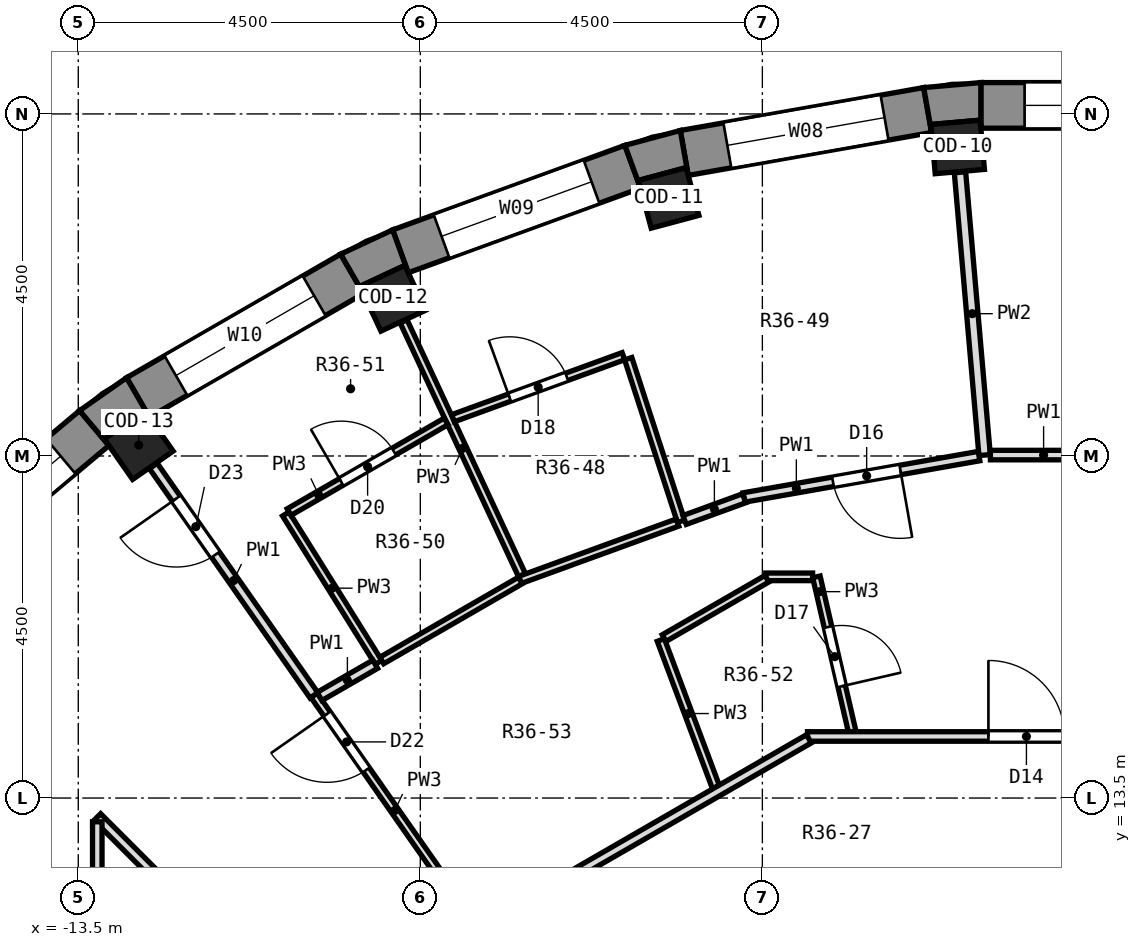
"""IFC4 building model, lengths in metres.
Left out: names, types, materials, properties, quantities, classifications, styles, units other than length and angle.
Written with IfcOpenShell. Run it as: python <this file> out.ifc"""

import sys

from ifc_helpers import new_model, si_unit, direction, frame, frame_2d, origin, origin_2d, place, context, subcontext, project, spatial, polyline, rectangle, outline, extrude, element, fill, save


model = new_model("IFC4")
c1 = context("Model", 3, precision=1e-05, world=origin(), true_north=direction((0.0, 1.0)))
c2 = subcontext(c1, "Body", "Model", "MODEL_VIEW")
j1 = project(units=[si_unit("LENGTHUNIT", "METRE"), si_unit("PLANEANGLEUNIT", "RADIAN")], contexts=[c1])
p1 = place(None, origin())
s1 = spatial("IfcSite", under=j1, at=p1, CompositionType="ELEMENT")
p2 = place(p1, origin())
s2 = spatial("IfcBuilding", under=s1, at=p2, CompositionType="ELEMENT")
p3 = place(p2, frame((0.0, 0.0, 259.4)))
s3 = spatial("IfcBuildingStorey", under=s2, at=p3, CompositionType="ELEMENT", Elevation=259.4)
for number, where, z_axis, x_axis in (
    (1, (-1.93, 22.066, 0.0), (0.0, 0.0, 1.0), (-0.087, 0.996, 0.0)),
    (2, (-5.733, 21.395, 0.0), (0.0, 0.0, 1.0), (-0.259, 0.966, 0.0)),
    (3, (-9.361, 20.075, 0.0), (0.0, 0.0, 1.0), (-0.423, 0.906, 0.0)),
    (4, (-12.705, 18.144, 0.0), (0.0, 0.0, 1.0), (-0.574, 0.819, 0.0)),
):
    element("IfcColumn", number, at=place(p3, frame(where, z_axis=z_axis, x_axis=x_axis)), inside=s3, PredefinedType="COLUMN", context=c2, shape_type="SweptSolid", body=[
        extrude(rectangle(XDim=0.65, YDim=0.65, at=origin_2d()), origin(), (0.0, 0.0, 1.0), 3.3),
    ])
p4 = place(p3, frame((1.626, 22.613, 0.0), z_axis=(0.0, 0.0, 1.0), x_axis=(-1.0, 0.0, 0.0)))
e5 = element("IfcWall", 5, at=p4, inside=s3, PredefinedType="SOLIDWALL", context=c2, shape_type="SweptSolid", body=[
    extrude(rectangle(XDim=3.251, YDim=0.6, at=frame_2d((1.626, 0.0))), origin(), (0.0, 0.0, 1.0), 2.9),
])
p5 = place(p4, frame((0.576, 0.0, 0.9)))
e6 = element("IfcOpeningElement", 6, at=p5, cuts=e5, PredefinedType="OPENING", context=c2, shape_type="SweptSolid", body=[
    extrude(rectangle(XDim=2.1, YDim=1.8, at=frame_2d((1.05, 0.9))), frame((0.0, 0.312, 0.0), z_axis=(0.0, -1.0, 0.0), x_axis=(1.0, 0.0, 0.0)), (0.0, 0.0, 1.0), 0.624),
])
p6 = place(p3, frame((-2.325, 22.551, 0.0), z_axis=(0.0, 0.0, 1.0), x_axis=(-0.984806225186, -0.173656842178, 0.0)))
e7 = element("IfcWall", 7, at=p6, inside=s3, PredefinedType="SOLIDWALL", context=c2, shape_type="SweptSolid", body=[
    extrude(rectangle(XDim=3.252, YDim=0.6, at=frame_2d((1.626, 0.0))), origin(), (0.0, 0.0, 1.0), 2.9),
])
p7 = place(p6, frame((0.576, 0.0, 0.9)))
e8 = element("IfcOpeningElement", 8, at=p7, cuts=e7, PredefinedType="OPENING", context=c2, shape_type="SweptSolid", body=[
    extrude(rectangle(XDim=2.1, YDim=1.8, at=frame_2d((1.05, 0.9))), frame((0.0, 0.312, 0.0), z_axis=(0.0, -1.0, 0.0), x_axis=(1.0, 0.0, 0.0)), (0.0, 0.0, 1.0), 0.624),
])
p8 = place(p3, frame((-6.206, 21.805, 0.0), z_axis=(0.0, 0.0, 1.0), x_axis=(-0.939679383794, -0.342056509473, 0.0)))
e9 = element("IfcWall", 9, at=p8, inside=s3, PredefinedType="SOLIDWALL", context=c2, shape_type="SweptSolid", body=[
    extrude(rectangle(XDim=3.252, YDim=0.6, at=frame_2d((1.626, 0.0))), origin(), (0.0, 0.0, 1.0), 2.9),
])
p9 = place(p8, frame((0.576, 0.0, 0.9)))
e10 = element("IfcOpeningElement", 10, at=p9, cuts=e9, PredefinedType="OPENING", context=c2, shape_type="SweptSolid", body=[
    extrude(rectangle(XDim=2.1, YDim=1.8, at=frame_2d((1.05, 0.9))), frame((0.0, 0.312, 0.0), z_axis=(0.0, -1.0, 0.0), x_axis=(1.0, 0.0, 0.0)), (0.0, 0.0, 1.0), 0.624),
])
p10 = place(p3, frame((-9.898, 20.396, 0.0), z_axis=(0.0, 0.0, 1.0), x_axis=(-0.866016800201, -0.500014901547, 0.0)))
e11 = element("IfcWall", 11, at=p10, inside=s3, PredefinedType="SOLIDWALL", context=c2, shape_type="SweptSolid", body=[
    extrude(rectangle(XDim=3.252, YDim=0.6, at=frame_2d((1.626, 0.0))), origin(), (0.0, 0.0, 1.0), 2.9),
])
p11 = place(p10, frame((0.576, 0.0, 0.9)))
e12 = element("IfcOpeningElement", 12, at=p11, cuts=e11, PredefinedType="OPENING", context=c2, shape_type="SweptSolid", body=[
    extrude(rectangle(XDim=2.1, YDim=1.8, at=frame_2d((1.05, 0.9))), frame((0.0, 0.312, 0.0), z_axis=(0.0, -1.0, 0.0), x_axis=(1.0, 0.0, 0.0)), (0.0, 0.0, 1.0), 0.624),
])
p12 = place(p3, frame((-13.29, 18.367, 0.0), z_axis=(0.0, 0.0, 1.0), x_axis=(-0.766056773982, -0.64277291405, 0.0)))
e13 = element("IfcWall", 13, at=p12, inside=s3, PredefinedType="SOLIDWALL", context=c2, shape_type="SweptSolid", body=[
    extrude(rectangle(XDim=3.252, YDim=0.6, at=frame_2d((1.626, 0.0))), origin(), (0.0, 0.0, 1.0), 2.9),
])
p13 = place(p12, frame((0.576, 0.0, 0.9)))
e14 = element("IfcOpeningElement", 14, at=p13, cuts=e13, PredefinedType="OPENING", context=c2, shape_type="SweptSolid", body=[
    extrude(rectangle(XDim=2.1, YDim=1.8, at=frame_2d((1.05, 0.9))), frame((0.0, 0.312, 0.0), z_axis=(0.0, -1.0, 0.0), x_axis=(1.0, 0.0, 0.0)), (0.0, 0.0, 1.0), 0.624),
])
p14 = place(p3, origin())
e15 = element("IfcWall", 15, at=p14, inside=s3, PredefinedType="SOLIDWALL", context=c2, shape_type="SweptSolid", body=[
    extrude(outline(polyline([(-1.626, 22.913), (-2.378, 22.847), (-2.273, 22.256), (-2.283, 22.361), (-1.635, 22.418), (-1.626, 22.312), (-1.626, 22.913)])), origin(), (0.0, 0.0, 1.0), 2.9),
])
p15 = place(p3, origin())
e16 = element("IfcWall", 16, at=p15, inside=s3, PredefinedType="SOLIDWALL", context=c2, shape_type="SweptSolid", body=[
    extrude(outline(polyline([(-6.309, 22.087), (-6.104, 21.523), (-6.131, 21.625), (-5.503, 21.793), (-5.476, 21.691), (-5.58, 22.282), (-6.309, 22.087)])), origin(), (0.0, 0.0, 1.0), 2.9),
])
p16 = place(p3, origin())
e17 = element("IfcWall", 17, at=p16, inside=s3, PredefinedType="SOLIDWALL", context=c2, shape_type="SweptSolid", body=[
    extrude(outline(polyline([(-9.364, 20.975), (-10.048, 20.656), (-9.748, 20.136), (-9.793, 20.232), (-9.204, 20.507), (-9.159, 20.411), (-9.364, 20.975)])), origin(), (0.0, 0.0, 1.0), 2.9),
])
p17 = place(p3, origin())
e18 = element("IfcWall", 18, at=p17, inside=s3, PredefinedType="SOLIDWALL", context=c2, shape_type="SweptSolid", body=[
    extrude(outline(polyline([(-12.864, 19.03), (-13.482, 18.597), (-13.097, 18.137), (-13.157, 18.224), (-12.625, 18.597), (-12.564, 18.51), (-12.864, 19.03)])), origin(), (0.0, 0.0, 1.0), 2.9),
])
p18 = place(p3, frame((-1.9, 21.732, 0.0), z_axis=(0.0, 0.0, 1.0), x_axis=(0.086821454474, -0.996223888011, 0.0)))
e19 = element("IfcWall", 19, at=p18, inside=s3, PredefinedType="PARTITIONING", context=c2, shape_type="SweptSolid", body=[
    extrude(rectangle(XDim=3.734, YDim=0.15, at=frame_2d((1.867, 0.0))), origin(), (0.0, 0.0, 1.0), 2.9),
])
p19 = place(p3, frame((-3.789, 16.41, 0.0), z_axis=(0.0, 0.0, 1.0), x_axis=(0.22503842629, -0.974349889256, 0.0)))
e20 = element("IfcWall", 20, at=p19, inside=s3, PredefinedType="PARTITIONING", context=c2, shape_type="SweptSolid", body=[
    extrude(rectangle(XDim=2.093, YDim=0.1, at=frame_2d((1.046, 0.0))), origin(), (0.0, 0.0, 1.0), 2.9),
])
p20 = place(p19, frame((0.677, 0.0, 0.0)))
e21 = element("IfcOpeningElement", 21, at=p20, cuts=e20, PredefinedType="OPENING", context=c2, shape_type="SweptSolid", body=[
    extrude(rectangle(XDim=0.8, YDim=2.1, at=frame_2d((0.4, 1.05))), frame((0.0, 0.062, 0.0), z_axis=(0.0, -1.0, 0.0), x_axis=(1.0, 0.0, 0.0)), (0.0, 0.0, 1.0), 0.124),
])
p21 = place(p3, frame((-6.265, 19.281, 0.0), z_axis=(0.0, 0.0, 1.0), x_axis=(0.308892186689, -0.951097059717, 0.0)))
e22 = element("IfcWall", 22, at=p21, inside=s3, PredefinedType="PARTITIONING", context=c2, shape_type="SweptSolid", body=[
    extrude(rectangle(XDim=2.25, YDim=0.1, at=frame_2d((1.125, 0.0))), origin(), (0.0, 0.0, 1.0), 2.9),
])
p22 = place(p3, frame((-5.836, 15.579, 0.0), z_axis=(0.0, 0.0, 1.0), x_axis=(0.350786772872, -0.936455359309, 0.0)))
e23 = element("IfcWall", 23, at=p22, inside=s3, PredefinedType="PARTITIONING", context=c2, shape_type="SweptSolid", body=[
    extrude(rectangle(XDim=2.066, YDim=0.1, at=frame_2d((1.033, 0.0))), origin(), (0.0, 0.0, 1.0), 2.9),
])
p23 = place(p3, frame((-9.22, 19.771, 0.0), z_axis=(0.0, 0.0, 1.0), x_axis=(0.422606093897, -0.906313460896, 0.0)))
e24 = element("IfcWall", 24, at=p23, inside=s3, PredefinedType="PARTITIONING", context=c2, shape_type="SweptSolid", body=[
    extrude(rectangle(XDim=3.684, YDim=0.1, at=frame_2d((1.842, 0.0))), origin(), (0.0, 0.0, 1.0), 2.9),
])
p24 = place(p3, frame((-10.77, 17.237, 0.0), z_axis=(0.0, 0.0, 1.0), x_axis=(0.529960807047, -0.848022135911, 0.0)))
e25 = element("IfcWall", 25, at=p24, inside=s3, PredefinedType="PARTITIONING", context=c2, shape_type="SweptSolid", body=[
    extrude(rectangle(XDim=2.302, YDim=0.1, at=frame_2d((1.151, 0.0))), origin(), (0.0, 0.0, 1.0), 2.9),
])
p25 = place(p3, frame((-10.399, 14.852, 0.0), z_axis=(0.0, 0.0, 1.0), x_axis=(0.573661423556, -0.819092529037, 0.0)))
e26 = element("IfcWall", 26, at=p25, inside=s3, PredefinedType="PARTITIONING", context=c2, shape_type="SweptSolid", body=[
    extrude(rectangle(XDim=3.703, YDim=0.1, at=frame_2d((1.852, 0.0))), origin(), (0.0, 0.0, 1.0), 2.9),
])
p26 = place(p25, frame((0.299, 0.0, 0.0)))
e27 = element("IfcOpeningElement", 27, at=p26, cuts=e26, PredefinedType="OPENING", context=c2, shape_type="SweptSolid", body=[
    extrude(rectangle(XDim=0.9, YDim=2.1, at=frame_2d((0.45, 1.05))), frame((0.0, 0.062, 0.0), z_axis=(0.0, -1.0, 0.0), x_axis=(1.0, 0.0, 0.0)), (0.0, 0.0, 1.0), 0.124),
])
p27 = place(p3, frame((-12.513, 17.87, 0.0), z_axis=(0.0, 0.0, 1.0), x_axis=(0.573564635471, -0.819160307228, 0.0)))
e28 = element("IfcWall", 28, at=p27, inside=s3, PredefinedType="PARTITIONING", context=c2, shape_type="SweptSolid", body=[
    extrude(rectangle(XDim=3.684, YDim=0.125, at=frame_2d((1.842, 0.0))), origin(), (0.0, 0.0, 1.0), 2.9),
])
p28 = place(p27, frame((0.526, 0.0, 0.0)))
e29 = element("IfcOpeningElement", 29, at=p28, cuts=e28, PredefinedType="OPENING", context=c2, shape_type="SweptSolid", body=[
    extrude(rectangle(XDim=0.9, YDim=2.1, at=frame_2d((0.45, 1.05))), frame((0.0, 0.074, 0.0), z_axis=(0.0, -1.0, 0.0), x_axis=(1.0, 0.0, 0.0)), (0.0, 0.0, 1.0), 0.149),
])
p29 = place(p3, frame((-13.25, 13.25, 0.0), z_axis=(0.0, 0.0, 1.0), x_axis=(0.707106781187, -0.707106781187, 0.0)))
e30 = element("IfcWall", 30, at=p29, inside=s3, PredefinedType="PARTITIONING", context=c2, shape_type="SweptSolid", body=[
    extrude(rectangle(XDim=3.923, YDim=0.125, at=frame_2d((1.961, 0.0))), origin(), (0.0, 0.0, 1.0), 2.9),
])
p30 = place(p3, frame((-3.906, 14.31, 0.0), z_axis=(0.0, 0.0, 1.0), x_axis=(1.0, 0.0, 0.0)))
e31 = element("IfcWall", 31, at=p30, inside=s3, PredefinedType="PARTITIONING", context=c2, shape_type="SweptSolid", body=[
    extrude(rectangle(XDim=7.677, YDim=0.125, at=frame_2d((3.838, 0.0))), origin(), (0.0, 0.0, 1.0), 2.9),
])
p31 = place(p30, frame((5.949, 0.0, 0.0)))
e32 = element("IfcOpeningElement", 32, at=p31, cuts=e31, PredefinedType="OPENING", context=c2, shape_type="SweptSolid", body=[
    extrude(rectangle(XDim=1.0, YDim=2.1, at=frame_2d((0.5, 1.05))), frame((0.0, 0.074, 0.0), z_axis=(0.0, -1.0, 0.0), x_axis=(1.0, 0.0, 0.0)), (0.0, 0.0, 1.0), 0.149),
])
p32 = place(p30, frame((2.38, 0.0, 0.0)))
e33 = element("IfcOpeningElement", 33, at=p32, cuts=e31, PredefinedType="OPENING", context=c2, shape_type="SweptSolid", body=[
    extrude(rectangle(XDim=1.0, YDim=2.1, at=frame_2d((0.5, 1.05))), frame((0.0, 0.074, 0.0), z_axis=(0.0, -1.0, 0.0), x_axis=(1.0, 0.0, 0.0)), (0.0, 0.0, 1.0), 0.149),
])
p33 = place(p3, frame((-4.455, 16.41, 0.0), z_axis=(0.0, 0.0, 1.0), x_axis=(1.0, 0.0, 0.0)))
e34 = element("IfcWall", 34, at=p33, inside=s3, PredefinedType="PARTITIONING", context=c2, shape_type="SweptSolid", body=[
    extrude(rectangle(XDim=0.616, YDim=0.1, at=frame_2d((0.308, 0.0))), origin(), (0.0, 0.0, 1.0), 2.9),
])
p34 = place(p3, frame((-1.5, 18.012, 0.0), z_axis=(0.0, 0.0, 1.0), x_axis=(1.0, 0.0, 0.0)))
e35 = element("IfcWall", 35, at=p34, inside=s3, PredefinedType="PARTITIONING", context=c2, shape_type="SweptSolid", body=[
    extrude(rectangle(XDim=3.0, YDim=0.125, at=frame_2d((1.5, 0.0))), origin(), (0.0, 0.0, 1.0), 2.9),
])
p35 = place(p34, frame((1.05, 0.0, 0.0)))
e36 = element("IfcOpeningElement", 36, at=p35, cuts=e35, PredefinedType="OPENING", context=c2, shape_type="SweptSolid", body=[
    extrude(rectangle(XDim=0.9, YDim=2.1, at=frame_2d((0.45, 1.05))), frame((0.0, 0.074, 0.0), z_axis=(0.0, -1.0, 0.0), x_axis=(1.0, 0.0, 0.0)), (0.0, 0.0, 1.0), 0.149),
])
p36 = place(p3, frame((-4.742, 17.454, 0.0), z_axis=(0.0, 0.0, 1.0), x_axis=(0.984857040105, 0.173368424332, 0.0)))
e37 = element("IfcWall", 37, at=p36, inside=s3, PredefinedType="PARTITIONING", context=c2, shape_type="SweptSolid", body=[
    extrude(rectangle(XDim=3.14, YDim=0.125, at=frame_2d((1.57, 0.0))), origin(), (0.0, 0.0, 1.0), 2.9),
])
p37 = place(p36, frame((1.189, 0.0, 0.0)))
e38 = element("IfcOpeningElement", 38, at=p37, cuts=e37, PredefinedType="OPENING", context=c2, shape_type="SweptSolid", body=[
    extrude(rectangle(XDim=0.9, YDim=2.1, at=frame_2d((0.45, 1.05))), frame((0.0, 0.074, 0.0), z_axis=(0.0, -1.0, 0.0), x_axis=(1.0, 0.0, 0.0)), (0.0, 0.0, 1.0), 0.149),
])
p38 = place(p3, frame((-7.689, 16.37, 0.0), z_axis=(0.0, 0.0, 1.0), x_axis=(0.939680214162, 0.342054228323, 0.0)))
e39 = element("IfcWall", 39, at=p38, inside=s3, PredefinedType="PARTITIONING", context=c2, shape_type="SweptSolid", body=[
    extrude(rectangle(XDim=2.205, YDim=0.1, at=frame_2d((1.103, 0.0))), origin(), (0.0, 0.0, 1.0), 2.9),
])
p39 = place(p3, frame((-5.523, 17.158, 0.0), z_axis=(0.0, 0.0, 1.0), x_axis=(0.939605379144, 0.342259742714, 0.0)))
e40 = element("IfcWall", 40, at=p39, inside=s3, PredefinedType="PARTITIONING", context=c2, shape_type="SweptSolid", body=[
    extrude(rectangle(XDim=0.834, YDim=0.125, at=frame_2d((0.417, 0.0))), origin(), (0.0, 0.0, 1.0), 2.9),
])
p40 = place(p3, frame((-8.57, 18.497, 0.0), z_axis=(0.0, 0.0, 1.0), x_axis=(0.939715724906, 0.341956658606, 0.0)))
e41 = element("IfcWall", 41, at=p40, inside=s3, PredefinedType="PARTITIONING", context=c2, shape_type="SweptSolid", body=[
    extrude(rectangle(XDim=2.386, YDim=0.1, at=frame_2d((1.193, 0.0))), origin(), (0.0, 0.0, 1.0), 2.9),
])
p41 = place(p40, frame((0.792, 0.0, 0.0)))
e42 = element("IfcOpeningElement", 42, at=p41, cuts=e41, PredefinedType="OPENING", context=c2, shape_type="SweptSolid", body=[
    extrude(rectangle(XDim=0.8, YDim=2.1, at=frame_2d((0.4, 1.05))), frame((0.0, 0.062, 0.0), z_axis=(0.0, -1.0, 0.0), x_axis=(1.0, 0.0, 0.0)), (0.0, 0.0, 1.0), 0.124),
])
p42 = place(p3, frame((-10.422, 10.507, 0.0), z_axis=(0.0, 0.0, 1.0), x_axis=(0.866068111199, 0.499926021291, 0.0)))
e43 = element("IfcWall", 43, at=p42, inside=s3, PredefinedType="PARTITIONING", context=c2, shape_type="SweptSolid", body=[
    extrude(rectangle(XDim=7.544, YDim=0.125, at=frame_2d((3.772, 0.0))), origin(), (0.0, 0.0, 1.0), 2.9),
])
p43 = place(p3, frame((-5.793, 15.604, 0.0), z_axis=(0.0, 0.0, 1.0), x_axis=(0.865992945458, 0.500056215256, 0.0)))
e44 = element("IfcWall", 44, at=p43, inside=s3, PredefinedType="PARTITIONING", context=c2, shape_type="SweptSolid", body=[
    extrude(rectangle(XDim=1.562, YDim=0.1, at=frame_2d((0.781, 0.0))), origin(), (0.0, 0.0, 1.0), 2.9),
])
p44 = place(p3, frame((-9.507, 15.31, 0.0), z_axis=(0.0, 0.0, 1.0), x_axis=(0.86604260665, 0.49997020258, 0.0)))
e45 = element("IfcWall", 45, at=p44, inside=s3, PredefinedType="PARTITIONING", context=c2, shape_type="SweptSolid", body=[
    extrude(rectangle(XDim=2.104, YDim=0.1, at=frame_2d((1.052, 0.0))), origin(), (0.0, 0.0, 1.0), 2.9),
])
p45 = place(p3, frame((-10.326, 14.837, 0.0), z_axis=(0.0, 0.0, 1.0), x_axis=(0.866031754707, 0.499988999718, 0.0)))
e46 = element("IfcWall", 46, at=p45, inside=s3, PredefinedType="PARTITIONING", context=c2, shape_type="SweptSolid", body=[
    extrude(rectangle(XDim=0.846, YDim=0.125, at=frame_2d((0.423, 0.0))), origin(), (0.0, 0.0, 1.0), 2.9),
])
p46 = place(p3, frame((-10.727, 17.262, 0.0), z_axis=(0.0, 0.0, 1.0), x_axis=(0.866011787705, 0.500023583, 0.0)))
e47 = element("IfcWall", 47, at=p46, inside=s3, PredefinedType="PARTITIONING", context=c2, shape_type="SweptSolid", body=[
    extrude(rectangle(XDim=2.386, YDim=0.1, at=frame_2d((1.193, 0.0))), origin(), (0.0, 0.0, 1.0), 2.9),
])
p47 = place(p46, frame((0.793, 0.0, 0.0)))
e48 = element("IfcOpeningElement", 48, at=p47, cuts=e47, PredefinedType="OPENING", context=c2, shape_type="SweptSolid", body=[
    extrude(rectangle(XDim=0.8, YDim=2.1, at=frame_2d((0.4, 1.05))), frame((0.0, 0.062, 0.0), z_axis=(0.0, -1.0, 0.0), x_axis=(1.0, 0.0, 0.0)), (0.0, 0.0, 1.0), 0.124),
])
p48 = place(p3, frame((-13.25, 9.25, 0.0), z_axis=(0.0, 0.0, 1.0), x_axis=(0.0, 1.0, 0.0)))
e49 = element("IfcWall", 49, at=p48, inside=s3, PredefinedType="PARTITIONING", context=c2, shape_type="SweptSolid", body=[
    extrude(rectangle(XDim=3.938, YDim=0.125, at=frame_2d((1.969, 0.0))), origin(), (0.0, 0.0, 1.0), 2.9),
])
p49 = place(p5, origin())
e50 = element("IfcWindow", 50, at=p49, inside=s3, PartitioningType="SINGLE_PANEL", PredefinedType="WINDOW", context=c2, shape_type="SweptSolid", body=[
    extrude(rectangle(XDim=2.1, YDim=1.8, at=frame_2d((1.05, 0.9))), frame((0.0, 0.18, 0.0), z_axis=(0.0, -1.0, 0.0), x_axis=(1.0, 0.0, 0.0)), (0.0, 0.0, 1.0), 0.06),
])
fill(e6, e50)
p50 = place(p7, origin())
e51 = element("IfcWindow", 51, at=p50, inside=s3, PartitioningType="SINGLE_PANEL", PredefinedType="WINDOW", context=c2, shape_type="SweptSolid", body=[
    extrude(rectangle(XDim=2.1, YDim=1.8, at=frame_2d((1.05, 0.9))), frame((0.0, 0.18, 0.0), z_axis=(0.0, -1.0, 0.0), x_axis=(1.0, 0.0, 0.0)), (0.0, 0.0, 1.0), 0.06),
])
fill(e8, e51)
p51 = place(p9, origin())
e52 = element("IfcWindow", 52, at=p51, inside=s3, PartitioningType="SINGLE_PANEL", PredefinedType="WINDOW", context=c2, shape_type="SweptSolid", body=[
    extrude(rectangle(XDim=2.1, YDim=1.8, at=frame_2d((1.05, 0.9))), frame((0.0, 0.18, 0.0), z_axis=(0.0, -1.0, 0.0), x_axis=(1.0, 0.0, 0.0)), (0.0, 0.0, 1.0), 0.06),
])
fill(e10, e52)
p52 = place(p11, origin())
e53 = element("IfcWindow", 53, at=p52, inside=s3, PartitioningType="SINGLE_PANEL", PredefinedType="WINDOW", context=c2, shape_type="SweptSolid", body=[
    extrude(rectangle(XDim=2.1, YDim=1.8, at=frame_2d((1.05, 0.9))), frame((0.0, 0.18, 0.0), z_axis=(0.0, -1.0, 0.0), x_axis=(1.0, 0.0, 0.0)), (0.0, 0.0, 1.0), 0.06),
])
fill(e12, e53)
p53 = place(p13, origin())
e54 = element("IfcWindow", 54, at=p53, inside=s3, PartitioningType="SINGLE_PANEL", PredefinedType="WINDOW", context=c2, shape_type="SweptSolid", body=[
    extrude(rectangle(XDim=2.1, YDim=1.8, at=frame_2d((1.05, 0.9))), frame((0.0, 0.18, 0.0), z_axis=(0.0, -1.0, 0.0), x_axis=(1.0, 0.0, 0.0)), (0.0, 0.0, 1.0), 0.06),
])
fill(e14, e54)
p54 = place(p32, origin())
e55 = element("IfcDoor", 55, at=p54, inside=s3, OperationType="SINGLE_SWING_LEFT", PredefinedType="DOOR", context=c2, shape_type="SweptSolid", body=[
    extrude(rectangle(XDim=1.0, YDim=2.1, at=frame_2d((0.5, 1.05))), frame((0.0, 0.025, 0.0), z_axis=(0.0, -1.0, 0.0), x_axis=(1.0, 0.0, 0.0)), (0.0, 0.0, 1.0), 0.05),
])
fill(e33, e55)
p55 = place(p37, frame((0.9, 0.0, 0.0), z_axis=(0.0, 0.0, 1.0), x_axis=(-1.0, 0.0, 0.0)))
e56 = element("IfcDoor", 56, at=p55, inside=s3, OperationType="SINGLE_SWING_LEFT", PredefinedType="DOOR", context=c2, shape_type="SweptSolid", body=[
    extrude(rectangle(XDim=0.9, YDim=2.1, at=frame_2d((0.45, 1.05))), frame((0.0, 0.025, 0.0), z_axis=(0.0, -1.0, 0.0), x_axis=(1.0, 0.0, 0.0)), (0.0, 0.0, 1.0), 0.05),
])
fill(e38, e56)
p56 = place(p20, origin())
e57 = element("IfcDoor", 57, at=p56, inside=s3, OperationType="SINGLE_SWING_RIGHT", PredefinedType="DOOR", context=c2, shape_type="SweptSolid", body=[
    extrude(rectangle(XDim=0.8, YDim=2.1, at=frame_2d((0.4, 1.05))), frame((0.0, 0.025, 0.0), z_axis=(0.0, -1.0, 0.0), x_axis=(1.0, 0.0, 0.0)), (0.0, 0.0, 1.0), 0.05),
])
fill(e21, e57)
p57 = place(p41, origin())
e58 = element("IfcDoor", 58, at=p57, inside=s3, OperationType="SINGLE_SWING_LEFT", PredefinedType="DOOR", context=c2, shape_type="SweptSolid", body=[
    extrude(rectangle(XDim=0.8, YDim=2.1, at=frame_2d((0.4, 1.05))), frame((0.0, 0.025, 0.0), z_axis=(0.0, -1.0, 0.0), x_axis=(1.0, 0.0, 0.0)), (0.0, 0.0, 1.0), 0.05),
])
fill(e42, e58)
p58 = place(p47, origin())
e59 = element("IfcDoor", 59, at=p58, inside=s3, OperationType="SINGLE_SWING_LEFT", PredefinedType="DOOR", context=c2, shape_type="SweptSolid", body=[
    extrude(rectangle(XDim=0.8, YDim=2.1, at=frame_2d((0.4, 1.05))), frame((0.0, 0.025, 0.0), z_axis=(0.0, -1.0, 0.0), x_axis=(1.0, 0.0, 0.0)), (0.0, 0.0, 1.0), 0.05),
])
fill(e48, e59)
p59 = place(p26, frame((0.9, 0.0, 0.0), z_axis=(0.0, 0.0, 1.0), x_axis=(-1.0, 0.0, 0.0)))
e60 = element("IfcDoor", 60, at=p59, inside=s3, OperationType="SINGLE_SWING_RIGHT", PredefinedType="DOOR", context=c2, shape_type="SweptSolid", body=[
    extrude(rectangle(XDim=0.9, YDim=2.1, at=frame_2d((0.45, 1.05))), frame((0.0, 0.025, 0.0), z_axis=(0.0, -1.0, 0.0), x_axis=(1.0, 0.0, 0.0)), (0.0, 0.0, 1.0), 0.05),
])
fill(e27, e60)
p60 = place(p28, frame((0.9, 0.0, 0.0), z_axis=(0.0, 0.0, 1.0), x_axis=(-1.0, 0.0, 0.0)))
e61 = element("IfcDoor", 61, at=p60, inside=s3, OperationType="SINGLE_SWING_RIGHT", PredefinedType="DOOR", context=c2, shape_type="SweptSolid", body=[
    extrude(rectangle(XDim=0.9, YDim=2.1, at=frame_2d((0.45, 1.05))), frame((0.0, 0.025, 0.0), z_axis=(0.0, -1.0, 0.0), x_axis=(1.0, 0.0, 0.0)), (0.0, 0.0, 1.0), 0.05),
])
fill(e29, e61)
save(model, sys.argv[1])
